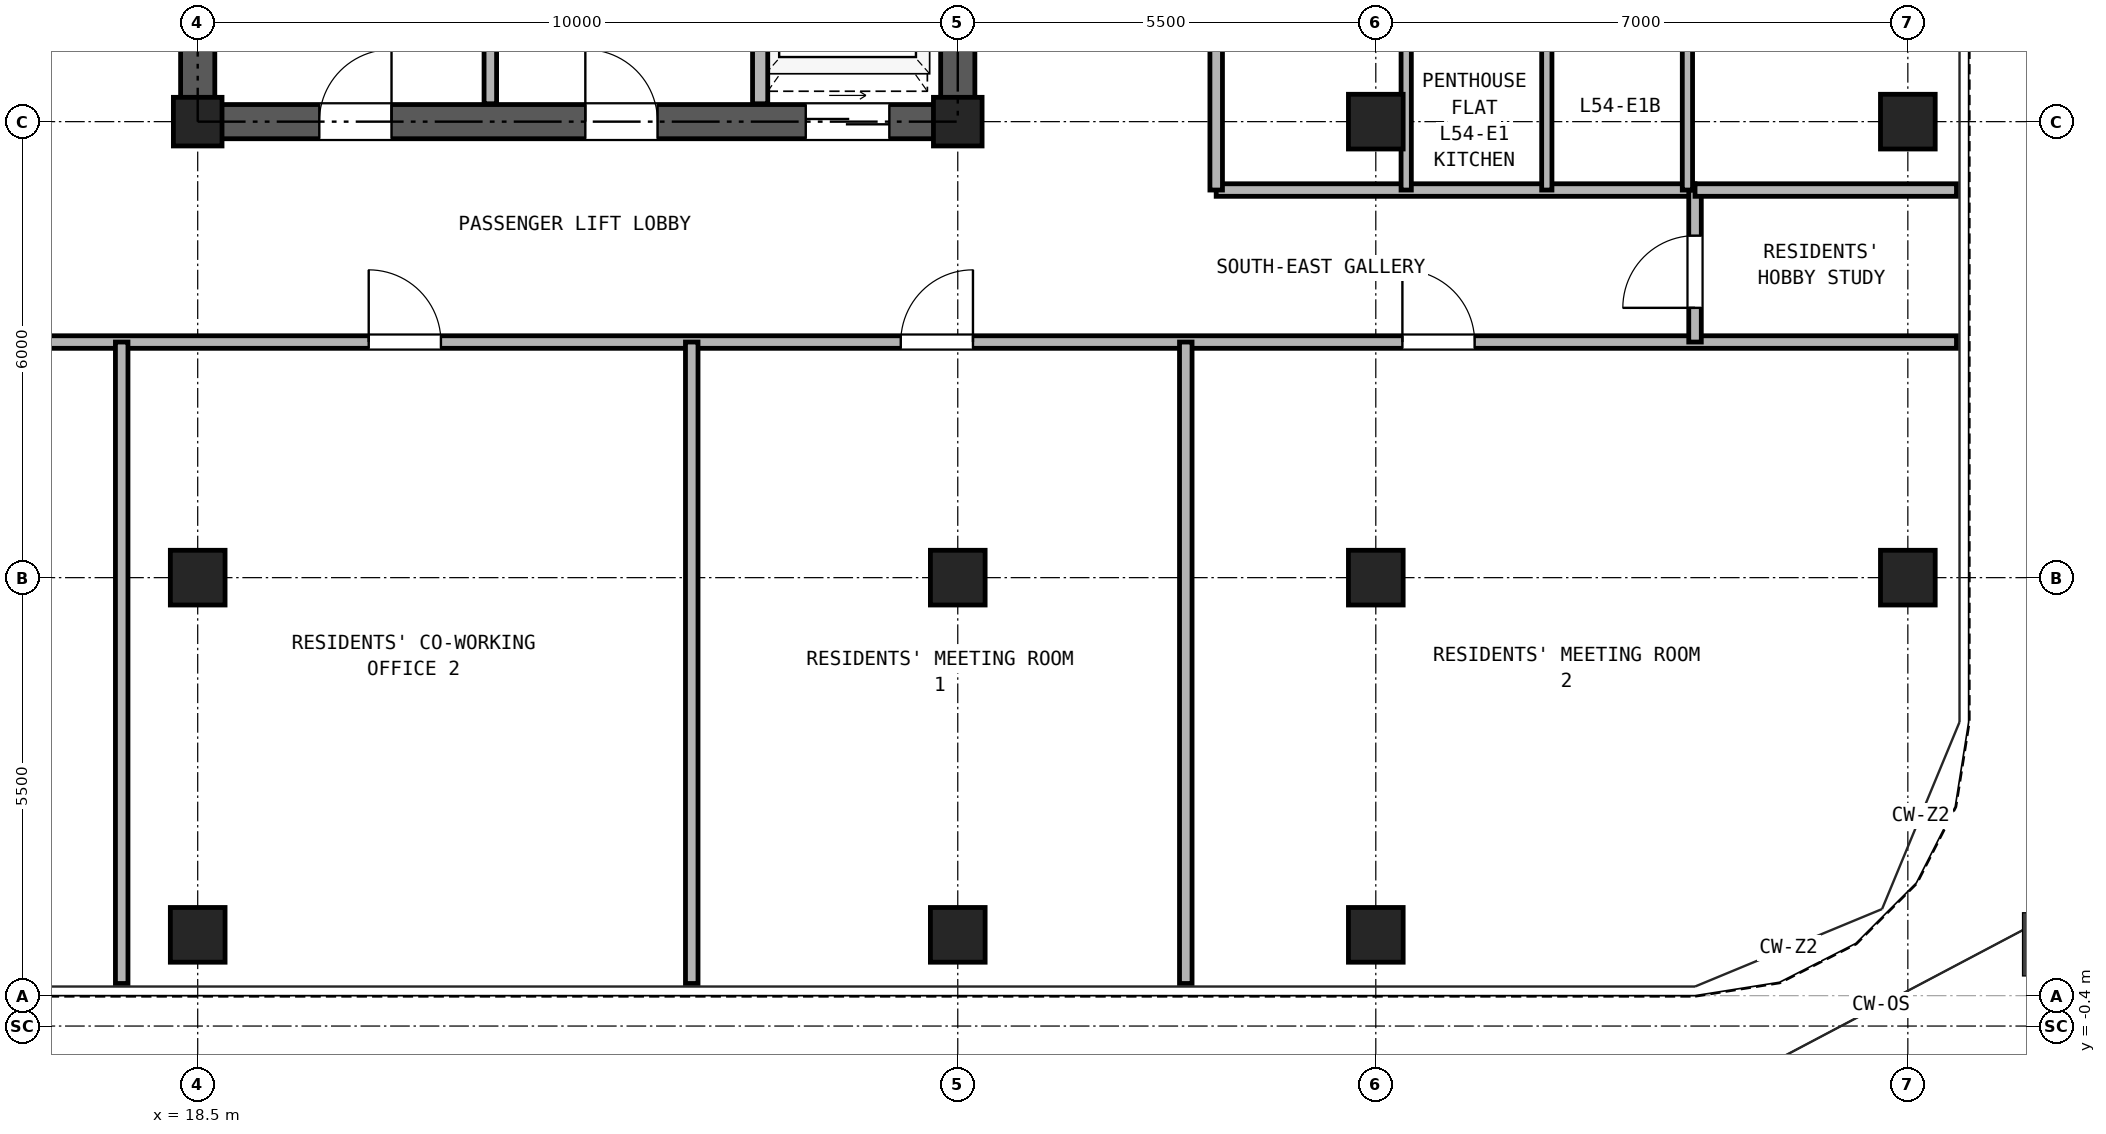
"""IFC4 building model, lengths in metres.
Left out: names, types, materials, properties, quantities, classifications, styles, units other than length and angle.
Written with IfcOpenShell. Run it as: python <this file> out.ifc"""

import sys

from ifc_helpers import new_model, si_unit, direction, frame, frame_2d, origin, origin_2d, place, context, subcontext, project, spatial, rectangle, hollow_rectangle, extrude, source, transform, mapped, element, fill, save


model = new_model("IFC4")
c1 = context("Model", 3, precision=1e-05, world=origin(), true_north=direction((0.0, 1.0)))
c2 = subcontext(c1, "Body", "Model", "MODEL_VIEW")
j1 = project(units=[si_unit("LENGTHUNIT", "METRE"), si_unit("PLANEANGLEUNIT", "RADIAN")], contexts=[c1])
p1 = place(None, origin())
s1 = spatial("IfcSite", under=j1, at=p1, CompositionType="ELEMENT")
p2 = place(p1, origin())
s2 = spatial("IfcBuilding", under=s1, at=p2, CompositionType="ELEMENT")
p3 = place(p2, frame((0.0, 0.0, 193.2)))
s3 = spatial("IfcBuildingStorey", under=s2, at=p3, CompositionType="ELEMENT", Elevation=193.2)
m1 = source(origin(), c2, "Body", "SweptSolid", [
    extrude(hollow_rectangle(XDim=0.72, YDim=0.72, WallThickness=0.04, at=origin_2d()), origin(), (0.0, 0.0, 1.0), 2.95),
])
for number, where, z_axis, x_axis in (
    (1, (18.5, 0.8, 0.0), (0.0, 0.0, 1.0), (1.0, 0.0, 0.0)),
    (2, (28.5, 0.8, 0.0), (0.0, 0.0, 1.0), (1.0, 0.0, 0.0)),
    (3, (34.0, 0.8, 0.0), (0.0, 0.0, 1.0), (1.0, 0.0, 0.0)),
    (4, (41.0, 5.5, 0.0), (0.0, 0.0, 1.0), (1.0, 0.0, 0.0)),
    (5, (41.0, 11.5, 0.0), (0.0, 0.0, 1.0), (1.0, 0.0, 0.0)),
    (6, (18.5, 5.5, 0.0), (0.0, 0.0, 1.0), (1.0, 0.0, 0.0)),
):
    element("IfcColumn", number, at=place(p3, frame(where, z_axis=z_axis, x_axis=x_axis)), inside=s3, PredefinedType="COLUMN", context=c2, shape_type="MappedRepresentation", body=[
        mapped(m1, transform((0.0, 0.0, 0.0), x_axis=(1.0, 0.0, 0.0), y_axis=(0.0, 1.0, 0.0), z_axis=(0.0, 0.0, 1.0), scale=1.0)),
    ])
m2 = source(origin(), c2, "Body", "SweptSolid", [
    extrude(hollow_rectangle(XDim=0.64, YDim=0.64, WallThickness=0.035, at=origin_2d()), origin(), (0.0, 0.0, 1.0), 2.95),
])
p4 = place(p3, frame((18.5, 11.5, 0.0), z_axis=(0.0, 0.0, 1.0), x_axis=(1.0, 0.0, 0.0)))
e7 = element("IfcColumn", 7, at=p4, inside=s3, PredefinedType="COLUMN", context=c2, shape_type="MappedRepresentation", body=[
    mapped(m2, transform((0.0, 0.0, 0.0), x_axis=(1.0, 0.0, 0.0), y_axis=(0.0, 1.0, 0.0), z_axis=(0.0, 0.0, 1.0), scale=1.0)),
])
p5 = place(p3, frame((28.5, 5.5, 0.0), z_axis=(0.0, 0.0, 1.0), x_axis=(1.0, 0.0, 0.0)))
e8 = element("IfcColumn", 8, at=p5, inside=s3, PredefinedType="COLUMN", context=c2, shape_type="MappedRepresentation", body=[
    mapped(m1, transform((0.0, 0.0, 0.0), x_axis=(1.0, 0.0, 0.0), y_axis=(0.0, 1.0, 0.0), z_axis=(0.0, 0.0, 1.0), scale=1.0)),
])
p6 = place(p3, frame((28.5, 11.5, 0.0), z_axis=(0.0, 0.0, 1.0), x_axis=(1.0, 0.0, 0.0)))
e9 = element("IfcColumn", 9, at=p6, inside=s3, PredefinedType="COLUMN", context=c2, shape_type="MappedRepresentation", body=[
    mapped(m2, transform((0.0, 0.0, 0.0), x_axis=(1.0, 0.0, 0.0), y_axis=(0.0, 1.0, 0.0), z_axis=(0.0, 0.0, 1.0), scale=1.0)),
])
for number, where, z_axis, x_axis in (
    (10, (34.0, 5.5, 0.0), (0.0, 0.0, 1.0), (1.0, 0.0, 0.0)),
    (11, (34.0, 11.5, 0.0), (0.0, 0.0, 1.0), (1.0, 0.0, 0.0)),
):
    element("IfcColumn", number, at=place(p3, frame(where, z_axis=z_axis, x_axis=x_axis)), inside=s3, PredefinedType="COLUMN", context=c2, shape_type="MappedRepresentation", body=[
        mapped(m1, transform((0.0, 0.0, 0.0), x_axis=(1.0, 0.0, 0.0), y_axis=(0.0, 1.0, 0.0), z_axis=(0.0, 0.0, 1.0), scale=1.0)),
    ])
p7 = place(p3, frame((18.275, 11.5, 0.0), z_axis=(0.0, 0.0, 1.0), x_axis=(1.0, 0.0, 0.0)))
e12 = element("IfcWall", 12, at=p7, inside=s3, PredefinedType="SHEAR", context=c2, shape_type="SweptSolid", body=[
    extrude(rectangle(XDim=10.45, YDim=0.45, at=frame_2d((5.225, 0.0))), origin(), (0.0, 0.0, 1.0), 2.95),
])
p8 = place(p7, frame((1.825, 0.0, 0.0)))
e13 = element("IfcOpeningElement", 13, at=p8, cuts=e12, PredefinedType="OPENING", context=c2, shape_type="SweptSolid", body=[
    extrude(rectangle(XDim=0.95, YDim=2.15, at=frame_2d((0.475, 1.075))), frame((0.0, 0.235, 0.0), z_axis=(0.0, -1.0, 0.0), x_axis=(1.0, 0.0, 0.0)), (0.0, 0.0, 1.0), 0.47),
])
p9 = place(p7, frame((5.325, 0.0, 0.0)))
e14 = element("IfcOpeningElement", 14, at=p9, cuts=e12, PredefinedType="OPENING", context=c2, shape_type="SweptSolid", body=[
    extrude(rectangle(XDim=0.95, YDim=2.15, at=frame_2d((0.475, 1.075))), frame((0.0, 0.235, 0.0), z_axis=(0.0, -1.0, 0.0), x_axis=(1.0, 0.0, 0.0)), (0.0, 0.0, 1.0), 0.47),
])
p10 = place(p7, frame((8.225, 0.0, 0.0)))
e15 = element("IfcOpeningElement", 15, at=p10, cuts=e12, PredefinedType="OPENING", context=c2, shape_type="SweptSolid", body=[
    extrude(rectangle(XDim=1.1, YDim=2.25, at=frame_2d((0.55, 1.125))), frame((0.0, 0.235, 0.0), z_axis=(0.0, -1.0, 0.0), x_axis=(1.0, 0.0, 0.0)), (0.0, 0.0, 1.0), 0.47),
])
p11 = place(p3, frame((18.5, 11.725, 0.0), z_axis=(0.0, 0.0, 1.0), x_axis=(0.0, 1.0, 0.0)))
e16 = element("IfcWall", 16, at=p11, inside=s3, PredefinedType="SHEAR", context=c2, shape_type="SweptSolid", body=[
    extrude(rectangle(XDim=16.8, YDim=0.45, at=frame_2d((8.4, 0.0))), origin(), (0.0, 0.0, 1.0), 2.95),
])
p12 = place(p11, frame((7.425, 0.0, 0.0)))
e17 = element("IfcOpeningElement", 17, at=p12, cuts=e16, PredefinedType="OPENING", context=c2, shape_type="SweptSolid", body=[
    extrude(rectangle(XDim=1.15, YDim=2.2, at=frame_2d((0.575, 1.1))), frame((0.0, 0.235, 0.0), z_axis=(0.0, -1.0, 0.0), x_axis=(1.0, 0.0, 0.0)), (0.0, 0.0, 1.0), 0.47),
])
p13 = place(p3, frame((28.5, 11.725, 0.0), z_axis=(0.0, 0.0, 1.0), x_axis=(0.0, 1.0, 0.0)))
e18 = element("IfcWall", 18, at=p13, inside=s3, PredefinedType="SHEAR", context=c2, shape_type="SweptSolid", body=[
    extrude(rectangle(XDim=16.8, YDim=0.45, at=frame_2d((8.4, 0.0))), origin(), (0.0, 0.0, 1.0), 2.95),
])
p14 = place(p13, frame((7.425, 0.0, 0.0)))
e19 = element("IfcOpeningElement", 19, at=p14, cuts=e18, PredefinedType="OPENING", context=c2, shape_type="SweptSolid", body=[
    extrude(rectangle(XDim=1.15, YDim=2.2, at=frame_2d((0.575, 1.1))), frame((0.0, 0.235, 0.0), z_axis=(0.0, -1.0, 0.0), x_axis=(1.0, 0.0, 0.0)), (0.0, 0.0, 1.0), 0.47),
])
p15 = place(p3, frame((22.35, 11.735, 0.0), z_axis=(0.0, 0.0, 1.0), x_axis=(0.0, 1.0, 0.0)))
e20 = element("IfcWall", 20, at=p15, inside=s3, PredefinedType="PARTITIONING", context=c2, shape_type="SweptSolid", body=[
    extrude(rectangle(XDim=3.265, YDim=0.165, at=frame_2d((1.632, 0.0))), origin(), (0.0, 0.0, 1.0), 2.95),
])
p16 = place(p3, frame((25.9, 11.735, 0.0), z_axis=(0.0, 0.0, 1.0), x_axis=(0.0, 1.0, 0.0)))
e21 = element("IfcWall", 21, at=p16, inside=s3, PredefinedType="PARTITIONING", context=c2, shape_type="SweptSolid", body=[
    extrude(rectangle(XDim=3.265, YDim=0.2, at=frame_2d((1.632, 0.0))), origin(), (0.0, 0.0, 1.0), 2.95),
])
p17 = place(p3, frame((0.16, 8.6, 0.0), z_axis=(0.0, 0.0, 1.0), x_axis=(1.0, 0.0, 0.0)))
e22 = element("IfcWall", 22, at=p17, inside=s3, PredefinedType="PARTITIONING", context=c2, shape_type="SweptSolid", body=[
    extrude(rectangle(XDim=41.48, YDim=0.165, at=frame_2d((20.74, 0.0))), origin(), (0.0, 0.0, 1.0), 2.583),
])
p18 = place(p17, frame((11.89, 0.0, 0.0)))
e23 = element("IfcOpeningElement", 23, at=p18, cuts=e22, PredefinedType="OPENING", context=c2, shape_type="SweptSolid", body=[
    extrude(rectangle(XDim=0.95, YDim=2.15, at=frame_2d((0.475, 1.075))), frame((0.0, 0.093, 0.0), z_axis=(0.0, -1.0, 0.0), x_axis=(1.0, 0.0, 0.0)), (0.0, 0.0, 1.0), 0.185),
])
p19 = place(p17, frame((20.59, 0.0, 0.0)))
e24 = element("IfcOpeningElement", 24, at=p19, cuts=e22, PredefinedType="OPENING", context=c2, shape_type="SweptSolid", body=[
    extrude(rectangle(XDim=0.95, YDim=2.15, at=frame_2d((0.475, 1.075))), frame((0.0, 0.093, 0.0), z_axis=(0.0, -1.0, 0.0), x_axis=(1.0, 0.0, 0.0)), (0.0, 0.0, 1.0), 0.185),
])
p20 = place(p17, frame((27.59, 0.0, 0.0)))
e25 = element("IfcOpeningElement", 25, at=p20, cuts=e22, PredefinedType="OPENING", context=c2, shape_type="SweptSolid", body=[
    extrude(rectangle(XDim=0.95, YDim=2.15, at=frame_2d((0.475, 1.075))), frame((0.0, 0.093, 0.0), z_axis=(0.0, -1.0, 0.0), x_axis=(1.0, 0.0, 0.0)), (0.0, 0.0, 1.0), 0.185),
])
p21 = place(p17, frame((34.19, 0.0, 0.0)))
e26 = element("IfcOpeningElement", 26, at=p21, cuts=e22, PredefinedType="OPENING", context=c2, shape_type="SweptSolid", body=[
    extrude(rectangle(XDim=0.95, YDim=2.15, at=frame_2d((0.475, 1.075))), frame((0.0, 0.093, 0.0), z_axis=(0.0, -1.0, 0.0), x_axis=(1.0, 0.0, 0.0)), (0.0, 0.0, 1.0), 0.185),
])
p22 = place(p3, frame((31.9, 10.6, 0.0), z_axis=(0.0, 0.0, 1.0), x_axis=(1.0, 0.0, 0.0)))
e27 = element("IfcWall", 27, at=p22, inside=s3, PredefinedType="PARTITIONING", context=c2, shape_type="SweptSolid", body=[
    extrude(rectangle(XDim=6.3, YDim=0.165, at=frame_2d((3.15, 0.0))), origin(), (0.0, 0.0, 1.0), 2.95),
])
p23 = place(p3, frame((38.2, 8.6, 0.0), z_axis=(0.0, 0.0, 1.0), x_axis=(0.0, 1.0, 0.0)))
e28 = element("IfcWall", 28, at=p23, inside=s3, PredefinedType="PARTITIONING", context=c2, shape_type="SweptSolid", body=[
    extrude(rectangle(XDim=2.0, YDim=0.165, at=frame_2d((1.0, 0.0))), origin(), (0.0, 0.0, 1.0), 2.95),
])
p24 = place(p23, frame((0.45, 0.0, 0.0)))
e29 = element("IfcOpeningElement", 29, at=p24, cuts=e28, PredefinedType="OPENING", context=c2, shape_type="SweptSolid", body=[
    extrude(rectangle(XDim=0.95, YDim=2.15, at=frame_2d((0.475, 1.075))), frame((0.0, 0.093, 0.0), z_axis=(0.0, -1.0, 0.0), x_axis=(1.0, 0.0, 0.0)), (0.0, 0.0, 1.0), 0.185),
])
p25 = place(p3, frame((31.9, 10.6, 0.0), z_axis=(0.0, 0.0, 1.0), x_axis=(0.0, 1.0, 0.0)))
e30 = element("IfcWall", 30, at=p25, inside=s3, PredefinedType="PARTITIONING", context=c2, shape_type="SweptSolid", body=[
    extrude(rectangle(XDim=24.54, YDim=0.165, at=frame_2d((12.27, 0.0))), origin(), (0.0, 0.0, 1.0), 2.95),
])
p26 = place(p25, frame((5.95, 0.0, 0.0)))
e31 = element("IfcOpeningElement", 31, at=p26, cuts=e30, PredefinedType="OPENING", context=c2, shape_type="SweptSolid", body=[
    extrude(rectangle(XDim=1.0, YDim=2.15, at=frame_2d((0.5, 1.075))), frame((0.0, 0.093, 0.0), z_axis=(0.0, -1.0, 0.0), x_axis=(1.0, 0.0, 0.0)), (0.0, 0.0, 1.0), 0.185),
])
p27 = place(p25, frame((16.65, 0.0, 0.0)))
e32 = element("IfcOpeningElement", 32, at=p27, cuts=e30, PredefinedType="OPENING", context=c2, shape_type="SweptSolid", body=[
    extrude(rectangle(XDim=1.0, YDim=2.15, at=frame_2d((0.5, 1.075))), frame((0.0, 0.093, 0.0), z_axis=(0.0, -1.0, 0.0), x_axis=(1.0, 0.0, 0.0)), (0.0, 0.0, 1.0), 0.185),
])
for number, where, z_axis, x_axis in (
    (33, (17.5, 0.16, 0.0), (0.0, 0.0, 1.0), (0.0, 1.0, 0.0)),
    (34, (25.0, 0.16, 0.0), (0.0, 0.0, 1.0), (0.0, 1.0, 0.0)),
    (35, (31.5, 0.16, 0.0), (0.0, 0.0, 1.0), (0.0, 1.0, 0.0)),
):
    element("IfcWall", number, at=place(p3, frame(where, z_axis=z_axis, x_axis=x_axis)), inside=s3, PredefinedType="PARTITIONING", context=c2, shape_type="SweptSolid", body=[
        extrude(rectangle(XDim=8.44, YDim=0.165, at=frame_2d((4.22, 0.0))), origin(), (0.0, 0.0, 1.0), 2.95),
    ])
p28 = place(p3, frame((38.2, 10.6, 0.0), z_axis=(0.0, 0.0, 1.0), x_axis=(1.0, 0.0, 0.0)))
e36 = element("IfcWall", 36, at=p28, inside=s3, PredefinedType="PARTITIONING", context=c2, shape_type="SweptSolid", body=[
    extrude(rectangle(XDim=3.44, YDim=0.165, at=frame_2d((1.72, 0.0))), origin(), (0.0, 0.0, 1.0), 2.95),
])
for number, where, z_axis, x_axis in (
    (37, (34.4, 10.6, 0.0), (0.0, 0.0, 1.0), (0.0, 1.0, 0.0)),
    (38, (36.25, 10.6, 0.0), (0.0, 0.0, 1.0), (0.0, 1.0, 0.0)),
    (39, (38.1, 10.6, 0.0), (0.0, 0.0, 1.0), (0.0, 1.0, 0.0)),
):
    element("IfcWall", number, at=place(p3, frame(where, z_axis=z_axis, x_axis=x_axis)), inside=s3, PredefinedType="PARTITIONING", context=c2, shape_type="SweptSolid", body=[
        extrude(rectangle(XDim=2.15, YDim=0.135, at=frame_2d((1.075, 0.0))), origin(), (0.0, 0.0, 1.0), 2.95),
    ])
p29 = place(p8, frame((0.95, 0.0, 0.0), z_axis=(0.0, 0.0, 1.0), x_axis=(-1.0, 0.0, 0.0)))
e40 = element("IfcDoor", 40, at=p29, inside=s3, OperationType="SINGLE_SWING_RIGHT", PredefinedType="DOOR", context=c2, shape_type="SweptSolid", body=[
    extrude(rectangle(XDim=0.95, YDim=2.15, at=frame_2d((0.475, 1.075))), frame((0.0, 0.025, 0.0), z_axis=(0.0, -1.0, 0.0), x_axis=(1.0, 0.0, 0.0)), (0.0, 0.0, 1.0), 0.05),
])
fill(e13, e40)
p30 = place(p9, frame((0.95, 0.0, 0.0), z_axis=(0.0, 0.0, 1.0), x_axis=(-1.0, 0.0, 0.0)))
e41 = element("IfcDoor", 41, at=p30, inside=s3, OperationType="SINGLE_SWING_LEFT", PredefinedType="DOOR", context=c2, shape_type="SweptSolid", body=[
    extrude(rectangle(XDim=0.95, YDim=2.15, at=frame_2d((0.475, 1.075))), frame((0.0, 0.025, 0.0), z_axis=(0.0, -1.0, 0.0), x_axis=(1.0, 0.0, 0.0)), (0.0, 0.0, 1.0), 0.05),
])
fill(e14, e41)
p31 = place(p10, frame((1.1, 0.0, 0.0), z_axis=(0.0, 0.0, 1.0), x_axis=(-1.0, 0.0, 0.0)))
e42 = element("IfcDoor", 42, at=p31, inside=s3, OperationType="DOUBLE_DOOR_SLIDING", PredefinedType="DOOR", context=c2, shape_type="SweptSolid", body=[
    extrude(rectangle(XDim=1.1, YDim=2.25, at=frame_2d((0.55, 1.125))), frame((0.0, 0.025, 0.0), z_axis=(0.0, -1.0, 0.0), x_axis=(1.0, 0.0, 0.0)), (0.0, 0.0, 1.0), 0.05),
])
fill(e15, e42)
p32 = place(p19, frame((0.95, 0.0, 0.0), z_axis=(0.0, 0.0, 1.0), x_axis=(-1.0, 0.0, 0.0)))
e43 = element("IfcDoor", 43, at=p32, inside=s3, OperationType="SINGLE_SWING_LEFT", PredefinedType="DOOR", context=c2, shape_type="SweptSolid", body=[
    extrude(rectangle(XDim=0.95, YDim=2.15, at=frame_2d((0.475, 1.075))), frame((0.0, 0.025, 0.0), z_axis=(0.0, -1.0, 0.0), x_axis=(1.0, 0.0, 0.0)), (0.0, 0.0, 1.0), 0.05),
])
fill(e24, e43)
p33 = place(p20, frame((0.95, 0.0, 0.0), z_axis=(0.0, 0.0, 1.0), x_axis=(-1.0, 0.0, 0.0)))
e44 = element("IfcDoor", 44, at=p33, inside=s3, OperationType="SINGLE_SWING_RIGHT", PredefinedType="DOOR", context=c2, shape_type="SweptSolid", body=[
    extrude(rectangle(XDim=0.95, YDim=2.15, at=frame_2d((0.475, 1.075))), frame((0.0, 0.025, 0.0), z_axis=(0.0, -1.0, 0.0), x_axis=(1.0, 0.0, 0.0)), (0.0, 0.0, 1.0), 0.05),
])
fill(e25, e44)
p34 = place(p21, frame((0.95, 0.0, 0.0), z_axis=(0.0, 0.0, 1.0), x_axis=(-1.0, 0.0, 0.0)))
e45 = element("IfcDoor", 45, at=p34, inside=s3, OperationType="SINGLE_SWING_LEFT", PredefinedType="DOOR", context=c2, shape_type="SweptSolid", body=[
    extrude(rectangle(XDim=0.95, YDim=2.15, at=frame_2d((0.475, 1.075))), frame((0.0, 0.025, 0.0), z_axis=(0.0, -1.0, 0.0), x_axis=(1.0, 0.0, 0.0)), (0.0, 0.0, 1.0), 0.05),
])
fill(e26, e45)
p35 = place(p24, origin())
e46 = element("IfcDoor", 46, at=p35, inside=s3, OperationType="SINGLE_SWING_LEFT", PredefinedType="DOOR", context=c2, shape_type="SweptSolid", body=[
    extrude(rectangle(XDim=0.95, YDim=2.15, at=frame_2d((0.475, 1.075))), frame((0.0, 0.025, 0.0), z_axis=(0.0, -1.0, 0.0), x_axis=(1.0, 0.0, 0.0)), (0.0, 0.0, 1.0), 0.05),
])
fill(e29, e46)
save(model, sys.argv[1])
